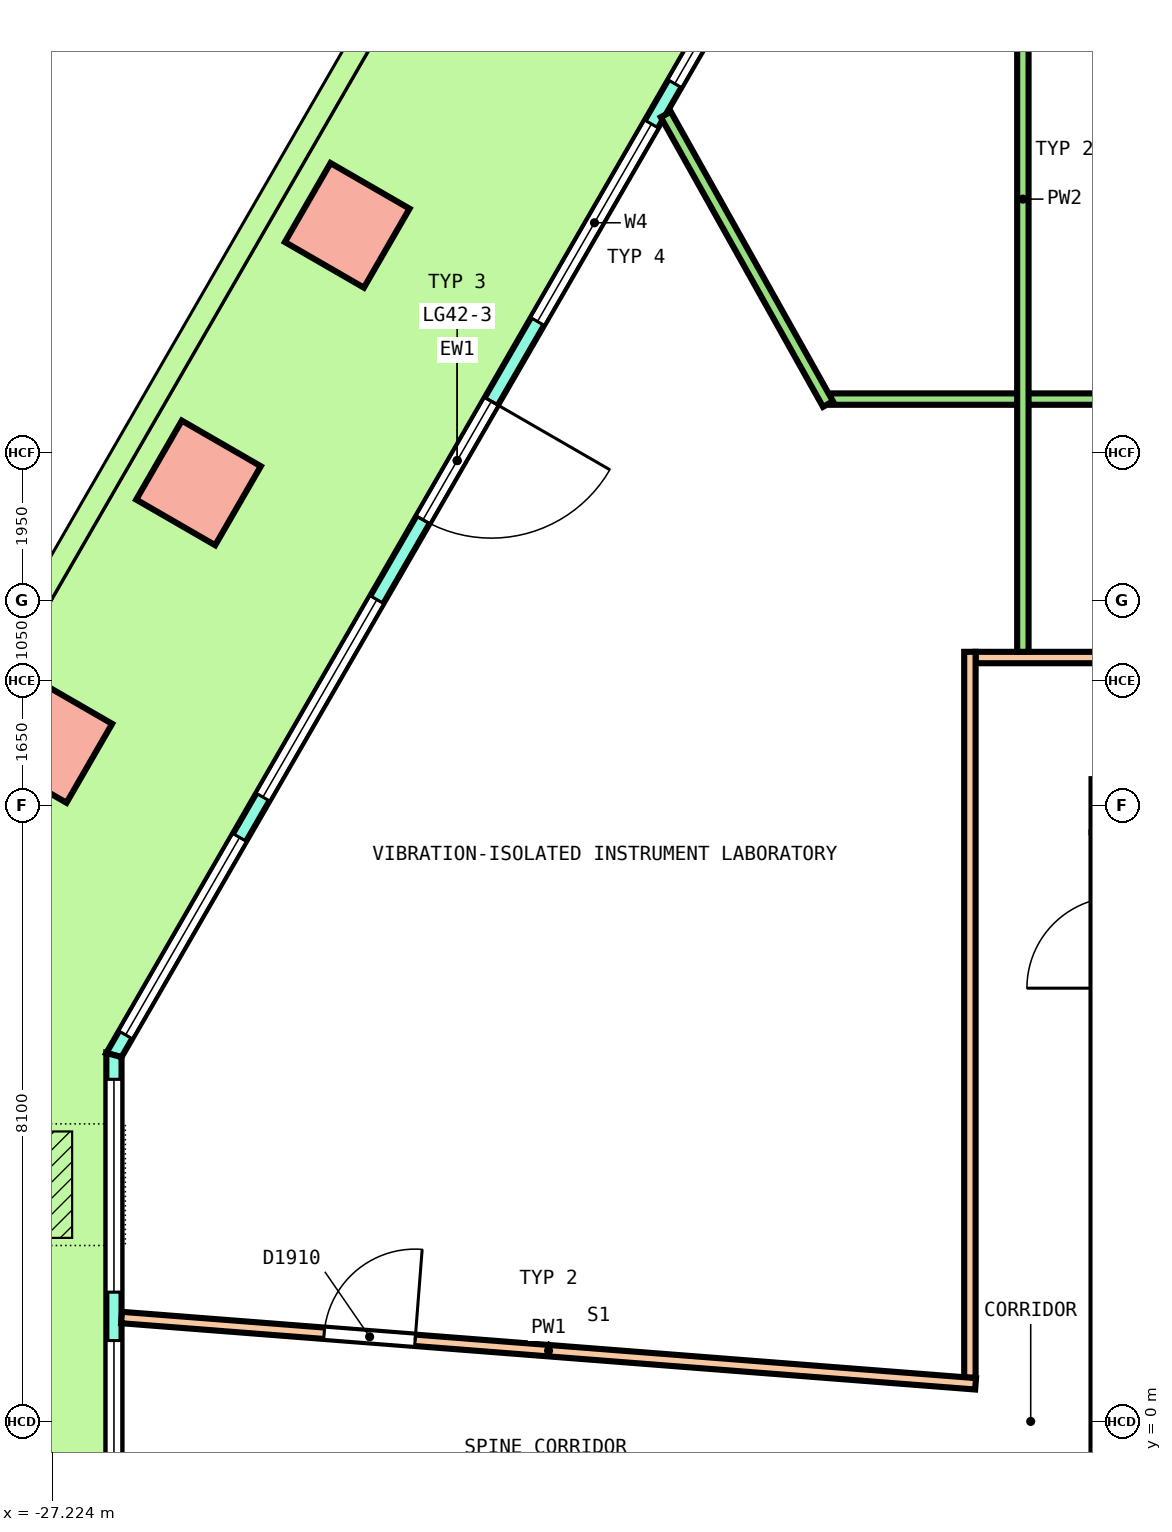
"""IFC4 building model, lengths in metres.
Left out: names, types, materials, properties, quantities, classifications, styles, units other than length and angle.
Written with IfcOpenShell. Run it as: python <this file> out.ifc"""

import sys

from ifc_helpers import new_model, si_unit, direction, frame, frame_2d, origin, origin_2d, place, context, subcontext, project, spatial, polyline, rectangle, outline, extrude, element, fill, save


model = new_model("IFC4")
c1 = context("Model", 3, precision=1e-05, world=origin(), true_north=direction((0.0, 1.0)))
c2 = subcontext(c1, "Body", "Model", "MODEL_VIEW")
j1 = project(units=[si_unit("LENGTHUNIT", "METRE"), si_unit("PLANEANGLEUNIT", "RADIAN")], contexts=[c1])
p1 = place(None, origin())
s1 = spatial("IfcSite", under=j1, at=p1, CompositionType="ELEMENT")
p2 = place(p1, origin())
s2 = spatial("IfcBuilding", under=s1, at=p2, CompositionType="ELEMENT")
p3 = place(p2, frame((0.0, 0.0, 193.6)))
s3 = spatial("IfcBuildingStorey", under=s2, at=p3, CompositionType="ELEMENT", Elevation=193.6)
for number, where, z_axis, x_axis in (
    (1, (-23.342, 15.736, 0.0), (0.0, 0.0, 1.0), (-0.5, -0.866, 0.0)),
    (2, (-25.299, 12.347, 0.0), (0.0, 0.0, 1.0), (-0.5, -0.866, 0.0)),
    (3, (-27.255, 8.959, 0.0), (0.0, 0.0, 1.0), (-0.5, -0.866, 0.0)),
):
    element("IfcColumn", number, at=place(p3, frame(where, z_axis=z_axis, x_axis=x_axis)), inside=s3, PredefinedType="COLUMN", context=c2, shape_type="SweptSolid", body=[
        extrude(rectangle(XDim=1.2, YDim=1.2, at=origin_2d()), origin(), (0.0, 0.0, 1.0), 4.04),
    ])
p4 = place(p3, frame((-17.38, 20.463, 0.0), z_axis=(0.0, 0.0, 1.0), x_axis=(-0.500000137386, -0.866025324465, 0.0)))
e4 = element("IfcWall", 4, at=p4, inside=s3, PredefinedType="SOLIDWALL", context=c2, shape_type="SweptSolid", body=[
    extrude(outline(polyline([(-0.027, -0.1), (0.979, -0.1), (1.986, -0.1), (2.992, -0.1), (3.999, -0.1), (5.005, -0.1), (6.012, -0.1), (7.018, -0.1), (8.025, -0.1), (9.031, -0.1), (10.038, -0.1), (11.044, -0.1), (12.051, -0.1), (13.057, -0.1), (14.063, -0.1), (15.07, -0.1), (16.076, -0.1), (17.083, -0.1), (18.089, -0.1), (18.036, 0.1), (17.035, 0.1), (16.035, 0.1), (15.034, 0.1), (14.034, 0.1), (13.033, 0.1), (12.033, 0.1), (11.032, 0.1), (10.032, 0.1), (9.031, 0.1), (8.031, 0.1), (7.03, 0.1), (6.03, 0.1), (5.029, 0.1), (4.029, 0.1), (3.028, 0.1), (2.028, 0.1), (1.027, 0.1), (0.027, 0.1), (-0.027, -0.1)])), origin(), (0.0, 0.0, 1.0), 4.1),
])
p5 = place(p4, frame((0.306, 0.0, 0.1)))
e5 = element("IfcOpeningElement", 5, at=p5, cuts=e4, PredefinedType="OPENING", context=c2, shape_type="SweptSolid", body=[
    extrude(rectangle(XDim=3.0, YDim=2.9, at=frame_2d((1.5, 1.45))), frame((0.0, 0.11, 0.0), z_axis=(0.0, -1.0, 0.0), x_axis=(1.0, 0.0, 0.0)), (0.0, 0.0, 1.0), 0.22),
])
p6 = place(p4, frame((3.919, 0.0, 0.1)))
e6 = element("IfcOpeningElement", 6, at=p6, cuts=e4, PredefinedType="OPENING", context=c2, shape_type="SweptSolid", body=[
    extrude(rectangle(XDim=3.0, YDim=2.9, at=frame_2d((1.5, 1.45))), frame((0.0, 0.11, 0.0), z_axis=(0.0, -1.0, 0.0), x_axis=(1.0, 0.0, 0.0)), (0.0, 0.0, 1.0), 0.22),
])
p7 = place(p4, frame((8.131, 0.0, 0.0)))
e7 = element("IfcOpeningElement", 7, at=p7, cuts=e4, PredefinedType="OPENING", context=c2, shape_type="SweptSolid", body=[
    extrude(rectangle(XDim=1.8, YDim=2.4, at=frame_2d((0.9, 1.2))), frame((0.0, 0.11, 0.0), z_axis=(0.0, -1.0, 0.0), x_axis=(1.0, 0.0, 0.0)), (0.0, 0.0, 1.0), 0.22),
])
p8 = place(p4, frame((8.131, 0.0, 2.55)))
e8 = element("IfcOpeningElement", 8, at=p8, cuts=e4, PredefinedType="OPENING", context=c2, shape_type="SweptSolid", body=[
    extrude(rectangle(XDim=1.8, YDim=0.45, at=frame_2d((0.9, 0.225))), frame((0.0, 0.11, 0.0), z_axis=(0.0, -1.0, 0.0), x_axis=(1.0, 0.0, 0.0)), (0.0, 0.0, 1.0), 0.22),
])
p9 = place(p4, frame((11.144, 0.0, 0.1)))
e9 = element("IfcOpeningElement", 9, at=p9, cuts=e4, PredefinedType="OPENING", context=c2, shape_type="SweptSolid", body=[
    extrude(rectangle(XDim=3.0, YDim=2.9, at=frame_2d((1.5, 1.45))), frame((0.0, 0.11, 0.0), z_axis=(0.0, -1.0, 0.0), x_axis=(1.0, 0.0, 0.0)), (0.0, 0.0, 1.0), 0.22),
])
p10 = place(p4, frame((14.756, 0.0, 0.1)))
e10 = element("IfcOpeningElement", 10, at=p10, cuts=e4, PredefinedType="OPENING", context=c2, shape_type="SweptSolid", body=[
    extrude(rectangle(XDim=3.0, YDim=2.9, at=frame_2d((1.5, 1.45))), frame((0.0, 0.11, 0.0), z_axis=(0.0, -1.0, 0.0), x_axis=(1.0, 0.0, 0.0)), (0.0, 0.0, 1.0), 0.22),
])
p11 = place(p3, frame((-26.411, 4.82, 0.0), z_axis=(0.0, 0.0, 1.0), x_axis=(0.0, -1.0, 0.0)))
e11 = element("IfcWall", 11, at=p11, inside=s3, PredefinedType="SOLIDWALL", context=c2, shape_type="SweptSolid", body=[
    extrude(outline(polyline([(-0.027, -0.1), (1.128, -0.1), (2.283, -0.1), (3.438, -0.1), (4.592, -0.1), (5.747, -0.1), (6.902, -0.1), (6.848, 0.1), (5.711, 0.1), (4.574, 0.1), (3.438, 0.1), (2.301, 0.1), (1.164, 0.1), (0.027, 0.1), (-0.027, -0.1)])), origin(), (0.0, 0.0, 1.0), 4.1),
])
p12 = place(p11, frame((0.319, 0.0, 0.1)))
e12 = element("IfcOpeningElement", 12, at=p12, cuts=e11, PredefinedType="OPENING", context=c2, shape_type="SweptSolid", body=[
    extrude(rectangle(XDim=2.8, YDim=2.9, at=frame_2d((1.4, 1.45))), frame((0.0, 0.11, 0.0), z_axis=(0.0, -1.0, 0.0), x_axis=(1.0, 0.0, 0.0)), (0.0, 0.0, 1.0), 0.22),
])
p13 = place(p11, frame((3.756, 0.0, 0.1)))
e13 = element("IfcOpeningElement", 13, at=p13, cuts=e11, PredefinedType="OPENING", context=c2, shape_type="SweptSolid", body=[
    extrude(rectangle(XDim=2.8, YDim=2.9, at=frame_2d((1.4, 1.45))), frame((0.0, 0.11, 0.0), z_axis=(0.0, -1.0, 0.0), x_axis=(1.0, 0.0, 0.0)), (0.0, 0.0, 1.0), 0.22),
])
p14 = place(p3, frame((-13.55, 8.1, 0.0), z_axis=(0.0, 0.0, 1.0), x_axis=(1.0, 0.0, 0.0)))
e14 = element("IfcWall", 14, at=p14, inside=s3, PredefinedType="SHEAR", context=c2, shape_type="SweptSolid", body=[
    extrude(rectangle(XDim=27.1, YDim=0.7, at=frame_2d((13.55, 0.0))), origin(), (0.0, 0.0, 1.0), 4.1),
])
p15 = place(p14, frame((14.475, 0.0, 0.0)))
e15 = element("IfcOpeningElement", 15, at=p15, cuts=e14, PredefinedType="OPENING", context=c2, shape_type="SweptSolid", body=[
    extrude(rectangle(XDim=1.4, YDim=2.1, at=frame_2d((0.7, 1.05))), frame((0.0, 0.36, 0.0), z_axis=(0.0, -1.0, 0.0), x_axis=(1.0, 0.0, 0.0)), (0.0, 0.0, 1.0), 0.72),
])
p16 = place(p3, frame((-13.2, -7.75, 0.0), z_axis=(0.0, 0.0, 1.0), x_axis=(0.0, 1.0, 0.0)))
e16 = element("IfcWall", 16, at=p16, inside=s3, PredefinedType="SHEAR", context=c2, shape_type="SweptSolid", body=[
    extrude(rectangle(XDim=15.5, YDim=0.7, at=frame_2d((7.75, 0.0))), origin(), (0.0, 0.0, 1.0), 4.1),
])
p17 = place(p16, frame((6.55, 0.0, 0.0)))
e17 = element("IfcOpeningElement", 17, at=p17, cuts=e16, PredefinedType="OPENING", context=c2, shape_type="SweptSolid", body=[
    extrude(rectangle(XDim=2.4, YDim=2.1, at=frame_2d((1.2, 1.05))), frame((0.0, 0.36, 0.0), z_axis=(0.0, -1.0, 0.0), x_axis=(1.0, 0.0, 0.0)), (0.0, 0.0, 1.0), 0.72),
])
p18 = place(p16, frame((13.45, 0.0, 0.0)))
e18 = element("IfcOpeningElement", 18, at=p18, cuts=e16, PredefinedType="OPENING", context=c2, shape_type="SweptSolid", body=[
    extrude(rectangle(XDim=1.2, YDim=2.1, at=frame_2d((0.6, 1.05))), frame((0.0, 0.36, 0.0), z_axis=(0.0, -1.0, 0.0), x_axis=(1.0, 0.0, 0.0)), (0.0, 0.0, 1.0), 0.72),
])
p19 = place(p16, frame((0.85, 0.0, 0.0)))
e19 = element("IfcOpeningElement", 19, at=p19, cuts=e16, PredefinedType="OPENING", context=c2, shape_type="SweptSolid", body=[
    extrude(rectangle(XDim=1.2, YDim=2.1, at=frame_2d((0.6, 1.05))), frame((0.0, 0.36, 0.0), z_axis=(0.0, -1.0, 0.0), x_axis=(1.0, 0.0, 0.0)), (0.0, 0.0, 1.0), 0.72),
])
p20 = place(p3, frame((-15.075, 10.05, 0.0), z_axis=(0.0, 0.0, 1.0), x_axis=(1.0, 0.0, 0.0)))
e20 = element("IfcWall", 20, at=p20, inside=s3, PredefinedType="PARTITIONING", context=c2, shape_type="SweptSolid", body=[
    extrude(rectangle(XDim=30.15, YDim=0.15, at=frame_2d((15.075, 0.0))), origin(), (0.0, 0.0, 1.0), 3.05),
])
p21 = place(p20, frame((26.573, 0.0, 0.0)))
e21 = element("IfcOpeningElement", 21, at=p21, cuts=e20, PredefinedType="OPENING", context=c2, shape_type="SweptSolid", body=[
    extrude(rectangle(XDim=1.0, YDim=2.1, at=frame_2d((0.5, 1.05))), frame((0.0, 0.085, 0.0), z_axis=(0.0, -1.0, 0.0), x_axis=(1.0, 0.0, 0.0)), (0.0, 0.0, 1.0), 0.17),
])
p22 = place(p20, frame((10.684, 0.0, 0.0)))
e22 = element("IfcOpeningElement", 22, at=p22, cuts=e20, PredefinedType="OPENING", context=c2, shape_type="SweptSolid", body=[
    extrude(rectangle(XDim=1.2, YDim=2.1, at=frame_2d((0.6, 1.05))), frame((0.0, 0.085, 0.0), z_axis=(0.0, -1.0, 0.0), x_axis=(1.0, 0.0, 0.0)), (0.0, 0.0, 1.0), 0.17),
])
p23 = place(p3, frame((-15.15, 0.576, 0.0), z_axis=(0.0, 0.0, 1.0), x_axis=(0.0, 1.0, 0.0)))
e23 = element("IfcWall", 23, at=p23, inside=s3, PredefinedType="PARTITIONING", context=c2, shape_type="SweptSolid", body=[
    extrude(rectangle(XDim=9.549, YDim=0.15, at=frame_2d((4.775, 0.0))), origin(), (0.0, 0.0, 1.0), 3.05),
])
p24 = place(p3, frame((-26.311, 1.367, 0.0), z_axis=(0.0, 0.0, 1.0), x_axis=(0.996999820834, -0.077403858151, 0.0)))
e24 = element("IfcWall", 24, at=p24, inside=s3, PredefinedType="PARTITIONING", context=c2, shape_type="SweptSolid", body=[
    extrude(rectangle(XDim=11.27, YDim=0.15, at=frame_2d((5.635, 0.0))), origin(), (0.0, 0.0, 1.0), 3.05),
])
p25 = place(p24, frame((2.674, 0.0, 0.0)))
e25 = element("IfcOpeningElement", 25, at=p25, cuts=e24, PredefinedType="OPENING", context=c2, shape_type="SweptSolid", body=[
    extrude(rectangle(XDim=1.2, YDim=2.1, at=frame_2d((0.6, 1.05))), frame((0.0, 0.085, 0.0), z_axis=(0.0, -1.0, 0.0), x_axis=(1.0, 0.0, 0.0)), (0.0, 0.0, 1.0), 0.17),
])
p26 = place(p3, frame((-16.979, 13.45, 0.0), z_axis=(0.0, 0.0, 1.0), x_axis=(1.0, 0.0, 0.0)))
e26 = element("IfcWall", 26, at=p26, inside=s3, PredefinedType="PARTITIONING", context=c2, shape_type="SweptSolid", body=[
    extrude(rectangle(XDim=35.454, YDim=0.15, at=frame_2d((17.727, 0.0))), origin(), (0.0, 0.0, 1.0), 3.05),
])
p27 = place(p26, frame((27.623, 0.0, 0.0)))
e27 = element("IfcOpeningElement", 27, at=p27, cuts=e26, PredefinedType="OPENING", context=c2, shape_type="SweptSolid", body=[
    extrude(rectangle(XDim=1.2, YDim=2.1, at=frame_2d((0.6, 1.05))), frame((0.0, 0.085, 0.0), z_axis=(0.0, -1.0, 0.0), x_axis=(1.0, 0.0, 0.0)), (0.0, 0.0, 1.0), 0.17),
])
p28 = place(p3, frame((-14.453, 10.125, 0.0), z_axis=(0.0, 0.0, 1.0), x_axis=(0.0, 1.0, 0.0)))
e28 = element("IfcWall", 28, at=p28, inside=s3, PredefinedType="PARTITIONING", context=c2, shape_type="SweptSolid", body=[
    extrude(rectangle(XDim=11.912, YDim=0.15, at=frame_2d((5.956, 0.0))), origin(), (0.0, 0.0, 1.0), 3.05),
])
p29 = place(p28, frame((8.152, 0.0, 0.0)))
e29 = element("IfcOpeningElement", 29, at=p29, cuts=e28, PredefinedType="OPENING", context=c2, shape_type="SweptSolid", body=[
    extrude(rectangle(XDim=1.0, YDim=2.1, at=frame_2d((0.5, 1.05))), frame((0.0, 0.085, 0.0), z_axis=(0.0, -1.0, 0.0), x_axis=(1.0, 0.0, 0.0)), (0.0, 0.0, 1.0), 0.17),
])
p30 = place(p3, frame((-19.151, 17.195, 0.0), z_axis=(0.0, 0.0, 1.0), x_axis=(0.48858294178, -0.872517454841, 0.0)))
e30 = element("IfcWall", 30, at=p30, inside=s3, PredefinedType="PARTITIONING", context=c2, shape_type="SweptSolid", body=[
    extrude(rectangle(XDim=4.367, YDim=0.15, at=frame_2d((2.184, 0.0))), origin(), (0.0, 0.0, 1.0), 3.05),
])
p31 = place(p5, origin())
e31 = element("IfcWindow", 31, at=p31, inside=s3, PartitioningType="SINGLE_PANEL", PredefinedType="WINDOW", context=c2, shape_type="SweptSolid", body=[
    extrude(rectangle(XDim=3.0, YDim=2.9, at=frame_2d((1.5, 1.45))), frame((0.0, 0.03, 0.0), z_axis=(0.0, -1.0, 0.0), x_axis=(1.0, 0.0, 0.0)), (0.0, 0.0, 1.0), 0.06),
])
fill(e5, e31)
p32 = place(p6, origin())
e32 = element("IfcWindow", 32, at=p32, inside=s3, PartitioningType="SINGLE_PANEL", PredefinedType="WINDOW", context=c2, shape_type="SweptSolid", body=[
    extrude(rectangle(XDim=3.0, YDim=2.9, at=frame_2d((1.5, 1.45))), frame((0.0, 0.03, 0.0), z_axis=(0.0, -1.0, 0.0), x_axis=(1.0, 0.0, 0.0)), (0.0, 0.0, 1.0), 0.06),
])
fill(e6, e32)
p33 = place(p7, origin())
e33 = element("IfcDoor", 33, at=p33, inside=s3, OperationType="DOUBLE_DOOR_SINGLE_SWING", PredefinedType="DOOR", context=c2, shape_type="SweptSolid", body=[
    extrude(rectangle(XDim=1.8, YDim=2.4, at=frame_2d((0.9, 1.2))), frame((0.0, 0.025, 0.0), z_axis=(0.0, -1.0, 0.0), x_axis=(1.0, 0.0, 0.0)), (0.0, 0.0, 1.0), 0.05),
])
fill(e7, e33)
p34 = place(p8, origin())
e34 = element("IfcWindow", 34, at=p34, inside=s3, PartitioningType="SINGLE_PANEL", PredefinedType="WINDOW", context=c2, shape_type="SweptSolid", body=[
    extrude(rectangle(XDim=1.8, YDim=0.45, at=frame_2d((0.9, 0.225))), frame((0.0, 0.03, 0.0), z_axis=(0.0, -1.0, 0.0), x_axis=(1.0, 0.0, 0.0)), (0.0, 0.0, 1.0), 0.06),
])
fill(e8, e34)
p35 = place(p9, origin())
e35 = element("IfcWindow", 35, at=p35, inside=s3, PartitioningType="SINGLE_PANEL", PredefinedType="WINDOW", context=c2, shape_type="SweptSolid", body=[
    extrude(rectangle(XDim=3.0, YDim=2.9, at=frame_2d((1.5, 1.45))), frame((0.0, 0.03, 0.0), z_axis=(0.0, -1.0, 0.0), x_axis=(1.0, 0.0, 0.0)), (0.0, 0.0, 1.0), 0.06),
])
fill(e9, e35)
p36 = place(p10, origin())
e36 = element("IfcWindow", 36, at=p36, inside=s3, PartitioningType="SINGLE_PANEL", PredefinedType="WINDOW", context=c2, shape_type="SweptSolid", body=[
    extrude(rectangle(XDim=3.0, YDim=2.9, at=frame_2d((1.5, 1.45))), frame((0.0, 0.03, 0.0), z_axis=(0.0, -1.0, 0.0), x_axis=(1.0, 0.0, 0.0)), (0.0, 0.0, 1.0), 0.06),
])
fill(e10, e36)
p37 = place(p12, origin())
e37 = element("IfcWindow", 37, at=p37, inside=s3, PartitioningType="SINGLE_PANEL", PredefinedType="WINDOW", context=c2, shape_type="SweptSolid", body=[
    extrude(rectangle(XDim=2.8, YDim=2.9, at=frame_2d((1.4, 1.45))), frame((0.0, 0.03, 0.0), z_axis=(0.0, -1.0, 0.0), x_axis=(1.0, 0.0, 0.0)), (0.0, 0.0, 1.0), 0.06),
])
fill(e12, e37)
p38 = place(p13, origin())
e38 = element("IfcWindow", 38, at=p38, inside=s3, PartitioningType="SINGLE_PANEL", PredefinedType="WINDOW", context=c2, shape_type="SweptSolid", body=[
    extrude(rectangle(XDim=2.8, YDim=2.9, at=frame_2d((1.4, 1.45))), frame((0.0, 0.03, 0.0), z_axis=(0.0, -1.0, 0.0), x_axis=(1.0, 0.0, 0.0)), (0.0, 0.0, 1.0), 0.06),
])
fill(e13, e38)
p39 = place(p25, origin())
e39 = element("IfcDoor", 39, at=p39, inside=s3, OperationType="DOUBLE_DOOR_SINGLE_SWING", PredefinedType="DOOR", context=c2, shape_type="SweptSolid", body=[
    extrude(rectangle(XDim=1.2, YDim=2.1, at=frame_2d((0.6, 1.05))), frame((0.0, 0.025, 0.0), z_axis=(0.0, -1.0, 0.0), x_axis=(1.0, 0.0, 0.0)), (0.0, 0.0, 1.0), 0.05),
])
fill(e25, e39)
save(model, sys.argv[1])
